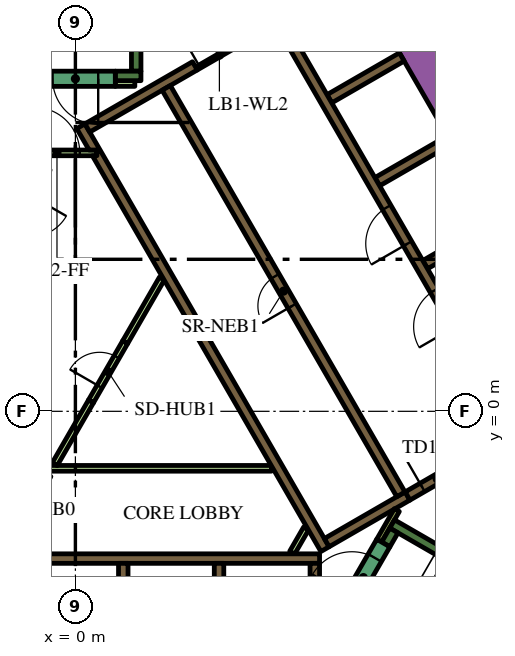
"""IFC4 building model, lengths in metres.
Left out: names, types, materials, properties, quantities, classifications, styles, units other than length and angle.
Written with IfcOpenShell. Run it as: python <this file> out.ifc"""

import sys

from ifc_helpers import new_model, si_unit, direction, frame, frame_2d, origin, place, context, subcontext, project, spatial, polyline, rectangle, outline, extrude, element, fill, save


model = new_model("IFC4")
c1 = context("Model", 3, precision=1e-05, world=origin(), true_north=direction((0.0, 1.0)))
c2 = subcontext(c1, "Body", "Model", "MODEL_VIEW")
j1 = project(units=[si_unit("LENGTHUNIT", "METRE"), si_unit("PLANEANGLEUNIT", "RADIAN")], contexts=[c1])
p1 = place(None, origin())
s1 = spatial("IfcSite", under=j1, at=p1, CompositionType="ELEMENT")
p2 = place(p1, origin())
s2 = spatial("IfcBuilding", under=s1, at=p2, CompositionType="ELEMENT")
p3 = place(p2, frame((0.0, 0.0, 27.6)))
s3 = spatial("IfcBuildingStorey", under=s2, at=p3, CompositionType="ELEMENT", Elevation=27.6)
p4 = place(p3, frame((6.776, 13.364, 0.0), z_axis=(0.0, 0.0, 1.0), x_axis=(0.500004177138, -0.8660229921, 0.0)))
e1 = element("IfcWall", 1, at=p4, inside=s3, PredefinedType="SOLIDWALL", context=c2, shape_type="SweptSolid", body=[
    extrude(rectangle(XDim=20.204, YDim=0.9, at=frame_2d((10.102, 0.0))), origin(), (0.0, 0.0, 1.0), 3.9),
])
p5 = place(p3, frame((8.334, -2.964, 0.0), z_axis=(0.0, 0.0, 1.0), x_axis=(0.866016039709, -0.500016218704, 0.0)))
e2 = element("IfcWall", 2, at=p5, inside=s3, PredefinedType="SOLIDWALL", context=c2, shape_type="SweptSolid", body=[
    extrude(rectangle(XDim=7.05, YDim=0.25, at=frame_2d((3.525, 0.0))), origin(), (0.0, 0.0, 1.0), 3.9),
])
p6 = place(p3, frame((8.168, -3.503, 0.0), z_axis=(0.0, 0.0, 1.0), x_axis=(0.49972245349, 0.866185586049, 0.0)))
e3 = element("IfcWall", 3, at=p6, inside=s3, PredefinedType="SOLIDWALL", context=c2, shape_type="SweptSolid", body=[
    extrude(rectangle(XDim=0.425, YDim=0.25, at=frame_2d((0.212, 0.0))), origin(), (0.0, 0.0, 1.0), 3.9),
])
p7 = place(p3, frame((1.6, 8.95, 0.0), z_axis=(0.0, 0.0, 1.0), x_axis=(0.0, 1.0, 0.0)))
e4 = element("IfcWall", 4, at=p7, inside=s3, PredefinedType="SOLIDWALL", context=c2, shape_type="SweptSolid", body=[
    extrude(rectangle(XDim=6.8, YDim=0.25, at=frame_2d((3.4, 0.0))), origin(), (0.0, 0.0, 1.0), 3.9),
])
p8 = place(p3, frame((1.05, 8.825, 0.0), z_axis=(0.0, 0.0, 1.0), x_axis=(1.0, 0.0, 0.0)))
e5 = element("IfcWall", 5, at=p8, inside=s3, PredefinedType="SOLIDWALL", context=c2, shape_type="SweptSolid", body=[
    extrude(rectangle(XDim=0.675, YDim=0.25, at=frame_2d((0.337, 0.0))), origin(), (0.0, 0.0, 1.0), 3.9),
])
p9 = place(p3, frame((-5.545, -3.875, 0.0), z_axis=(0.0, 0.0, 1.0), x_axis=(1.0, 0.0, 0.0)))
e6 = element("IfcWall", 6, at=p9, inside=s3, PredefinedType="SOLIDWALL", context=c2, shape_type="SweptSolid", body=[
    extrude(rectangle(XDim=11.97, YDim=0.25, at=frame_2d((5.985, 0.0))), origin(), (0.0, 0.0, 1.0), 3.9),
])
p10 = place(p3, frame((6.3, -7.268, 0.0), z_axis=(0.0, 0.0, 1.0), x_axis=(0.0, 1.0, 0.0)))
e7 = element("IfcWall", 7, at=p10, inside=s3, PredefinedType="SOLIDWALL", context=c2, shape_type="SweptSolid", body=[
    extrude(rectangle(XDim=3.268, YDim=0.25, at=frame_2d((1.634, 0.0))), origin(), (0.0, 0.0, 1.0), 3.9),
])
for number, where, z_axis, x_axis in (
    (8, (3.78, -4.0, 0.0), (0.0, 0.0, 1.0), (0.0, -1.0, 0.0)),
    (9, (1.26, -4.0, 0.0), (0.0, 0.0, 1.0), (0.0, -1.0, 0.0)),
):
    element("IfcWall", number, at=place(p3, frame(where, z_axis=z_axis, x_axis=x_axis)), inside=s3, PredefinedType="SOLIDWALL", context=c2, shape_type="SweptSolid", body=[
        extrude(rectangle(XDim=2.2, YDim=0.25, at=frame_2d((1.1, 0.0))), origin(), (0.0, 0.0, 1.0), 3.9),
    ])
p11 = place(p3, origin())
e10 = element("IfcWall", 10, at=p11, inside=s3, PredefinedType="SOLIDWALL", context=c2, shape_type="SweptSolid", body=[
    extrude(outline(polyline([(0.566, 6.725), (0.566, 6.875), (0.566, 6.875), (0.565, 6.875), (0.361, 6.875), (0.035, 7.439), (0.252, 7.564), (0.377, 7.348), (6.552, -3.348), (6.677, -3.564), (6.46, -3.689), (0.448, 6.725), (0.565, 6.725), (0.566, 6.725), (0.566, 6.725)])), origin(), (0.0, 0.0, 1.0), 3.9),
])
p12 = place(p3, frame((0.314, 7.456, 0.0), z_axis=(0.0, 0.0, 1.0), x_axis=(0.866013897511, 0.50001992892, 0.0)))
e11 = element("IfcWall", 11, at=p12, inside=s3, PredefinedType="SOLIDWALL", context=c2, shape_type="SweptSolid", body=[
    extrude(rectangle(XDim=3.268, YDim=0.25, at=frame_2d((1.634, 0.0))), origin(), (0.0, 0.0, 1.0), 3.9),
])
p13 = place(p3, frame((6.614, -3.456, 0.0), z_axis=(0.0, 0.0, 1.0), x_axis=(0.866031582473, 0.499989298045, 0.0)))
e12 = element("IfcWall", 12, at=p13, inside=s3, PredefinedType="SOLIDWALL", context=c2, shape_type="SweptSolid", body=[
    extrude(rectangle(XDim=2.455, YDim=0.25, at=frame_2d((1.228, 0.0))), origin(), (0.0, 0.0, 1.0), 3.9),
])
for number, where, z_axis, x_axis in (
    (13, (6.684, 8.224, 0.0), (0.0, 0.0, 1.0), (0.866, 0.5, 0.0)),
    (14, (7.944, 6.041, 0.0), (0.0, 0.0, 1.0), (0.866, 0.5, 0.0)),
    (15, (9.204, 3.859, 0.0), (0.0, 0.0, 1.0), (0.866, 0.5, 0.0)),
):
    element("IfcWall", number, at=place(p3, frame(where, z_axis=z_axis, x_axis=x_axis)), inside=s3, PredefinedType="SOLIDWALL", context=c2, shape_type="SweptSolid", body=[
        extrude(rectangle(XDim=2.2, YDim=0.25, at=frame_2d((1.1, 0.0))), origin(), (0.0, 0.0, 1.0), 3.9),
    ])
p14 = place(p3, frame((5.705, -3.718, 0.0), z_axis=(0.0, 0.0, 1.0), x_axis=(0.499962090823, 0.866047289552, 0.0)))
e16 = element("IfcWall", 16, at=p14, inside=s3, PredefinedType="PARTITIONING", context=c2, shape_type="SweptSolid", body=[
    extrude(rectangle(XDim=0.735, YDim=0.15, at=frame_2d((0.367, 0.0))), origin(), (0.0, 0.0, 1.0), 2.75),
])
p15 = place(p3, frame((8.459, -2.599, 0.0), z_axis=(0.0, 0.0, 1.0), x_axis=(-0.500041054325, -0.866001699761, 0.0)))
e17 = element("IfcWall", 17, at=p15, inside=s3, PredefinedType="PARTITIONING", context=c2, shape_type="SweptSolid", body=[
    extrude(rectangle(XDim=0.929, YDim=0.15, at=frame_2d((0.464, 0.0))), origin(), (0.0, 0.0, 1.0), 3.9),
])
p16 = place(p3, frame((-4.2, -1.5, 0.0), z_axis=(0.0, 0.0, 1.0), x_axis=(1.0, 0.0, 0.0)))
e18 = element("IfcWall", 18, at=p16, inside=s3, PredefinedType="PARTITIONING", context=c2, shape_type="SweptSolid", body=[
    extrude(rectangle(XDim=9.359, YDim=0.15, at=frame_2d((4.68, 0.0))), origin(), (0.0, 0.0, 1.0), 2.75),
])
p17 = place(p3, frame((-0.544, -1.393, 0.0), z_axis=(0.0, 0.0, 1.0), x_axis=(0.499928740635, 0.866066541489, 0.0)))
e19 = element("IfcWall", 19, at=p17, inside=s3, PredefinedType="PARTITIONING", context=c2, shape_type="SweptSolid", body=[
    extrude(rectangle(XDim=1.912, YDim=0.15, at=frame_2d((0.956, 0.0))), origin(), (0.0, 0.0, 1.0), 2.75),
])
p18 = place(p3, frame((1.312, 1.822, 0.0), z_axis=(0.0, 0.0, 1.0), x_axis=(0.500003549559, 0.866023354436, 0.0)))
e20 = element("IfcWall", 20, at=p18, inside=s3, PredefinedType="PARTITIONING", context=c2, shape_type="SweptSolid", body=[
    extrude(rectangle(XDim=1.93, YDim=0.15, at=frame_2d((0.965, 0.0))), origin(), (0.0, 0.0, 1.0), 2.75),
])
p19 = place(p3, frame((1.05, 8.625, 0.0), z_axis=(0.0, 0.0, 1.0), x_axis=(1.0, 0.0, 0.0)))
e21 = element("IfcWall", 21, at=p19, inside=s3, PredefinedType="PARTITIONING", context=c2, shape_type="SweptSolid", body=[
    extrude(rectangle(XDim=0.514, YDim=0.15, at=frame_2d((0.257, 0.0))), origin(), (0.0, 0.0, 1.0), 2.75),
])
p20 = place(p3, frame((11.553, -0.46, 0.0), z_axis=(0.0, 0.0, 1.0), x_axis=(-0.500006514828, 0.866021642414, 0.0)))
e22 = element("IfcWall", 22, at=p20, inside=s3, PredefinedType="SOLIDWALL", context=c2, shape_type="SweptSolid", body=[
    extrude(rectangle(XDim=12.35, YDim=0.25, at=frame_2d((6.175, 0.0))), origin(), (0.0, 0.0, 1.0), 3.9),
])
p21 = place(p20, frame((0.585, 0.0, 0.0)))
e23 = element("IfcOpeningElement", 23, at=p21, cuts=e22, PredefinedType="OPENING", context=c2, shape_type="SweptSolid", body=[
    extrude(rectangle(XDim=1.1, YDim=2.1, at=frame_2d((0.55, 1.05))), frame((0.0, 0.135, 0.0), z_axis=(0.0, -1.0, 0.0), x_axis=(1.0, 0.0, 0.0)), (0.0, 0.0, 1.0), 0.27),
])
p22 = place(p20, frame((3.105, 0.0, 0.0)))
e24 = element("IfcOpeningElement", 24, at=p22, cuts=e22, PredefinedType="OPENING", context=c2, shape_type="SweptSolid", body=[
    extrude(rectangle(XDim=1.1, YDim=2.1, at=frame_2d((0.55, 1.05))), frame((0.0, 0.135, 0.0), z_axis=(0.0, -1.0, 0.0), x_axis=(1.0, 0.0, 0.0)), (0.0, 0.0, 1.0), 0.27),
])
p23 = place(p20, frame((5.625, 0.0, 0.0)))
e25 = element("IfcOpeningElement", 25, at=p23, cuts=e22, PredefinedType="OPENING", context=c2, shape_type="SweptSolid", body=[
    extrude(rectangle(XDim=1.1, YDim=2.1, at=frame_2d((0.55, 1.05))), frame((0.0, 0.135, 0.0), z_axis=(0.0, -1.0, 0.0), x_axis=(1.0, 0.0, 0.0)), (0.0, 0.0, 1.0), 0.27),
])
p24 = place(p3, frame((8.565, -2.185, 0.0), z_axis=(0.0, 0.0, 1.0), x_axis=(-0.499997954832, 0.866026584559, 0.0)))
e26 = element("IfcWall", 26, at=p24, inside=s3, PredefinedType="SOLIDWALL", context=c2, shape_type="SweptSolid", body=[
    extrude(rectangle(XDim=12.35, YDim=0.25, at=frame_2d((6.175, 0.0))), origin(), (0.0, 0.0, 1.0), 3.9),
])
p25 = place(p24, frame((5.725, 0.0, 0.0)))
e27 = element("IfcOpeningElement", 27, at=p25, cuts=e26, PredefinedType="OPENING", context=c2, shape_type="SweptSolid", body=[
    extrude(rectangle(XDim=0.9, YDim=2.1, at=frame_2d((0.45, 1.05))), frame((0.0, 0.135, 0.0), z_axis=(0.0, -1.0, 0.0), x_axis=(1.0, 0.0, 0.0)), (0.0, 0.0, 1.0), 0.27),
])
p26 = place(p3, frame((7.053, -5.284, 0.0), z_axis=(0.0, 0.0, 1.0), x_axis=(0.500078061341, 0.865980330357, 0.0)))
e28 = element("IfcWall", 28, at=p26, inside=s3, PredefinedType="SOLIDWALL", context=c2, shape_type="SweptSolid", body=[
    extrude(rectangle(XDim=2.1, YDim=0.4, at=frame_2d((1.05, 0.0))), origin(), (0.0, 0.0, 1.0), 3.9),
])
p27 = place(p26, frame((0.45, 0.0, 0.0)))
e29 = element("IfcOpeningElement", 29, at=p27, cuts=e28, PredefinedType="OPENING", context=c2, shape_type="SweptSolid", body=[
    extrude(rectangle(XDim=1.2, YDim=2.1, at=frame_2d((0.6, 1.05))), frame((0.0, 0.21, 0.0), z_axis=(0.0, -1.0, 0.0), x_axis=(1.0, 0.0, 0.0)), (0.0, 0.0, 1.0), 0.42),
])
p28 = place(p3, frame((8.74, -2.229, 0.0), z_axis=(0.0, 0.0, 1.0), x_axis=(0.865989075817, 0.500062916607, 0.0)))
e30 = element("IfcWall", 30, at=p28, inside=s3, PredefinedType="SOLIDWALL", context=c2, shape_type="SweptSolid", body=[
    extrude(rectangle(XDim=1.8, YDim=0.25, at=frame_2d((0.9, 0.0))), origin(), (0.0, 0.0, 1.0), 3.9),
])
p29 = place(p28, frame((0.45, 0.0, 0.0)))
e31 = element("IfcOpeningElement", 31, at=p29, cuts=e30, PredefinedType="OPENING", context=c2, shape_type="SweptSolid", body=[
    extrude(rectangle(XDim=0.9, YDim=2.1, at=frame_2d((0.45, 1.05))), frame((0.0, 0.135, 0.0), z_axis=(0.0, -1.0, 0.0), x_axis=(1.0, 0.0, 0.0)), (0.0, 0.0, 1.0), 0.27),
])
p30 = place(p3, frame((1.05, 8.75, 0.0), z_axis=(0.0, 0.0, 1.0), x_axis=(-1.0, 0.0, 0.0)))
e32 = element("IfcWall", 32, at=p30, inside=s3, PredefinedType="SOLIDWALL", context=c2, shape_type="SweptSolid", body=[
    extrude(rectangle(XDim=2.1, YDim=0.4, at=frame_2d((1.05, 0.0))), origin(), (0.0, 0.0, 1.0), 3.9),
])
p31 = place(p30, frame((0.45, 0.0, 0.0)))
e33 = element("IfcOpeningElement", 33, at=p31, cuts=e32, PredefinedType="OPENING", context=c2, shape_type="SweptSolid", body=[
    extrude(rectangle(XDim=1.2, YDim=2.1, at=frame_2d((0.6, 1.05))), frame((0.0, 0.21, 0.0), z_axis=(0.0, -1.0, 0.0), x_axis=(1.0, 0.0, 0.0)), (0.0, 0.0, 1.0), 0.42),
])
p32 = place(p3, frame((-1.534, 6.8, 0.0), z_axis=(0.0, 0.0, 1.0), x_axis=(1.0, 0.0, 0.0)))
e34 = element("IfcWall", 34, at=p32, inside=s3, PredefinedType="PARTITIONING", context=c2, shape_type="SweptSolid", body=[
    extrude(rectangle(XDim=2.1, YDim=0.15, at=frame_2d((1.05, 0.0))), origin(), (0.0, 0.0, 1.0), 2.75),
])
p33 = place(p32, frame((0.45, 0.0, 0.0)))
e35 = element("IfcOpeningElement", 35, at=p33, cuts=e34, PredefinedType="OPENING", context=c2, shape_type="SweptSolid", body=[
    extrude(rectangle(XDim=1.2, YDim=2.1, at=frame_2d((0.6, 1.05))), frame((0.0, 0.085, 0.0), z_axis=(0.0, -1.0, 0.0), x_axis=(1.0, 0.0, 0.0)), (0.0, 0.0, 1.0), 0.17),
])
p34 = place(p3, frame((3.183, 9.02, 0.0), z_axis=(0.0, 0.0, 1.0), x_axis=(0.866034573852, 0.49998411664, 0.0)))
e36 = element("IfcWall", 36, at=p34, inside=s3, PredefinedType="PARTITIONING", context=c2, shape_type="SweptSolid", body=[
    extrude(rectangle(XDim=1.4, YDim=0.09, at=frame_2d((0.7, 0.0))), origin(), (0.0, 0.0, 1.0), 2.75),
])
p35 = place(p34, frame((0.1, 0.0, 0.0)))
e37 = element("IfcOpeningElement", 37, at=p35, cuts=e36, PredefinedType="OPENING", context=c2, shape_type="SweptSolid", body=[
    extrude(rectangle(XDim=1.2, YDim=2.1, at=frame_2d((0.6, 1.05))), frame((0.0, 0.055, 0.0), z_axis=(0.0, -1.0, 0.0), x_axis=(1.0, 0.0, 0.0)), (0.0, 0.0, 1.0), 0.11),
])
p36 = place(p3, frame((0.412, 0.263, 0.0), z_axis=(0.0, 0.0, 1.0), x_axis=(0.500062916607, 0.865989075817, 0.0)))
e38 = element("IfcWall", 38, at=p36, inside=s3, PredefinedType="PARTITIONING", context=c2, shape_type="SweptSolid", body=[
    extrude(rectangle(XDim=1.8, YDim=0.15, at=frame_2d((0.9, 0.0))), origin(), (0.0, 0.0, 1.0), 2.75),
])
p37 = place(p36, frame((0.45, 0.0, 0.0)))
e39 = element("IfcOpeningElement", 39, at=p37, cuts=e38, PredefinedType="OPENING", context=c2, shape_type="SweptSolid", body=[
    extrude(rectangle(XDim=0.9, YDim=2.1, at=frame_2d((0.45, 1.05))), frame((0.0, 0.085, 0.0), z_axis=(0.0, -1.0, 0.0), x_axis=(1.0, 0.0, 0.0)), (0.0, 0.0, 1.0), 0.17),
])
p38 = place(p3, frame((6.163, 18.475, 0.0), z_axis=(0.0, 0.0, 1.0), x_axis=(0.500001317485, -0.866024643133, 0.0)))
e40 = element("IfcWall", 40, at=p38, inside=s3, PredefinedType="PARTITIONING", context=c2, shape_type="SweptSolid", body=[
    extrude(rectangle(XDim=25.767, YDim=0.15, at=frame_2d((12.883, 0.0))), origin(), (0.0, 0.0, 1.0), 2.75),
])
p39 = place(p38, frame((24.586, 0.0, 0.0)))
e41 = element("IfcOpeningElement", 41, at=p39, cuts=e40, PredefinedType="OPENING", context=c2, shape_type="SweptSolid", body=[
    extrude(rectangle(XDim=1.0, YDim=2.1, at=frame_2d((0.5, 1.05))), frame((0.0, 0.085, 0.0), z_axis=(0.0, -1.0, 0.0), x_axis=(1.0, 0.0, 0.0)), (0.0, 0.0, 1.0), 0.17),
])
p40 = place(p38, frame((19.319, 0.0, 0.0)))
e42 = element("IfcOpeningElement", 42, at=p40, cuts=e40, PredefinedType="OPENING", context=c2, shape_type="SweptSolid", body=[
    extrude(rectangle(XDim=1.0, YDim=2.1, at=frame_2d((0.5, 1.05))), frame((0.0, 0.085, 0.0), z_axis=(0.0, -1.0, 0.0), x_axis=(1.0, 0.0, 0.0)), (0.0, 0.0, 1.0), 0.17),
])
p41 = place(p38, frame((18.012, 0.0, 0.0)))
e43 = element("IfcOpeningElement", 43, at=p41, cuts=e40, PredefinedType="OPENING", context=c2, shape_type="SweptSolid", body=[
    extrude(rectangle(XDim=1.0, YDim=2.1, at=frame_2d((0.5, 1.05))), frame((0.0, 0.085, 0.0), z_axis=(0.0, -1.0, 0.0), x_axis=(1.0, 0.0, 0.0)), (0.0, 0.0, 1.0), 0.17),
])
p42 = place(p38, frame((6.824, 0.0, 0.0)))
e44 = element("IfcOpeningElement", 44, at=p42, cuts=e40, PredefinedType="OPENING", context=c2, shape_type="SweptSolid", body=[
    extrude(rectangle(XDim=1.1, YDim=2.1, at=frame_2d((0.55, 1.05))), frame((0.0, 0.085, 0.0), z_axis=(0.0, -1.0, 0.0), x_axis=(1.0, 0.0, 0.0)), (0.0, 0.0, 1.0), 0.17),
])
p43 = place(p38, frame((4.658, 0.0, 0.0)))
e45 = element("IfcOpeningElement", 45, at=p43, cuts=e40, PredefinedType="OPENING", context=c2, shape_type="SweptSolid", body=[
    extrude(rectangle(XDim=0.9, YDim=2.1, at=frame_2d((0.45, 1.05))), frame((0.0, 0.085, 0.0), z_axis=(0.0, -1.0, 0.0), x_axis=(1.0, 0.0, 0.0)), (0.0, 0.0, 1.0), 0.17),
])
p44 = place(p38, frame((0.18, 0.0, 0.0)))
e46 = element("IfcOpeningElement", 46, at=p44, cuts=e40, PredefinedType="OPENING", context=c2, shape_type="SweptSolid", body=[
    extrude(rectangle(XDim=1.0, YDim=2.1, at=frame_2d((0.5, 1.05))), frame((0.0, 0.085, 0.0), z_axis=(0.0, -1.0, 0.0), x_axis=(1.0, 0.0, 0.0)), (0.0, 0.0, 1.0), 0.17),
])
p45 = place(p22, origin())
e47 = element("IfcDoor", 47, at=p45, inside=s3, OperationType="DOUBLE_DOOR_SLIDING", PredefinedType="DOOR", context=c2, shape_type="SweptSolid", body=[
    extrude(rectangle(XDim=1.1, YDim=2.1, at=frame_2d((0.55, 1.05))), frame((0.0, 0.025, 0.0), z_axis=(0.0, -1.0, 0.0), x_axis=(1.0, 0.0, 0.0)), (0.0, 0.0, 1.0), 0.05),
])
fill(e24, e47)
p46 = place(p23, origin())
e48 = element("IfcDoor", 48, at=p46, inside=s3, OperationType="DOUBLE_DOOR_SLIDING", PredefinedType="DOOR", context=c2, shape_type="SweptSolid", body=[
    extrude(rectangle(XDim=1.1, YDim=2.1, at=frame_2d((0.55, 1.05))), frame((0.0, 0.025, 0.0), z_axis=(0.0, -1.0, 0.0), x_axis=(1.0, 0.0, 0.0)), (0.0, 0.0, 1.0), 0.05),
])
fill(e25, e48)
p47 = place(p25, origin())
e49 = element("IfcDoor", 49, at=p47, inside=s3, OperationType="SINGLE_SWING_LEFT", PredefinedType="DOOR", context=c2, shape_type="SweptSolid", body=[
    extrude(rectangle(XDim=0.9, YDim=2.1, at=frame_2d((0.45, 1.05))), frame((0.0, 0.025, 0.0), z_axis=(0.0, -1.0, 0.0), x_axis=(1.0, 0.0, 0.0)), (0.0, 0.0, 1.0), 0.05),
])
fill(e27, e49)
p48 = place(p27, origin())
e50 = element("IfcDoor", 50, at=p48, inside=s3, OperationType="SINGLE_SWING_LEFT", PredefinedType="DOOR", context=c2, shape_type="SweptSolid", body=[
    extrude(rectangle(XDim=1.2, YDim=2.1, at=frame_2d((0.6, 1.05))), frame((0.0, 0.025, 0.0), z_axis=(0.0, -1.0, 0.0), x_axis=(1.0, 0.0, 0.0)), (0.0, 0.0, 1.0), 0.05),
])
fill(e29, e50)
p49 = place(p29, origin())
e51 = element("IfcDoor", 51, at=p49, inside=s3, OperationType="SINGLE_SWING_LEFT", PredefinedType="DOOR", context=c2, shape_type="SweptSolid", body=[
    extrude(rectangle(XDim=0.9, YDim=2.1, at=frame_2d((0.45, 1.05))), frame((0.0, 0.025, 0.0), z_axis=(0.0, -1.0, 0.0), x_axis=(1.0, 0.0, 0.0)), (0.0, 0.0, 1.0), 0.05),
])
fill(e31, e51)
p50 = place(p31, origin())
e52 = element("IfcDoor", 52, at=p50, inside=s3, OperationType="SINGLE_SWING_LEFT", PredefinedType="DOOR", context=c2, shape_type="SweptSolid", body=[
    extrude(rectangle(XDim=1.2, YDim=2.1, at=frame_2d((0.6, 1.05))), frame((0.0, 0.025, 0.0), z_axis=(0.0, -1.0, 0.0), x_axis=(1.0, 0.0, 0.0)), (0.0, 0.0, 1.0), 0.05),
])
fill(e33, e52)
p51 = place(p33, origin())
e53 = element("IfcDoor", 53, at=p51, inside=s3, OperationType="SINGLE_SWING_LEFT", PredefinedType="DOOR", context=c2, shape_type="SweptSolid", body=[
    extrude(rectangle(XDim=1.2, YDim=2.1, at=frame_2d((0.6, 1.05))), frame((0.0, 0.025, 0.0), z_axis=(0.0, -1.0, 0.0), x_axis=(1.0, 0.0, 0.0)), (0.0, 0.0, 1.0), 0.05),
])
fill(e35, e53)
p52 = place(p35, origin())
e54 = element("IfcDoor", 54, at=p52, inside=s3, OperationType="SINGLE_SWING_LEFT", PredefinedType="DOOR", context=c2, shape_type="SweptSolid", body=[
    extrude(rectangle(XDim=1.2, YDim=2.1, at=frame_2d((0.6, 1.05))), frame((0.0, 0.025, 0.0), z_axis=(0.0, -1.0, 0.0), x_axis=(1.0, 0.0, 0.0)), (0.0, 0.0, 1.0), 0.05),
])
fill(e37, e54)
p53 = place(p37, origin())
e55 = element("IfcDoor", 55, at=p53, inside=s3, OperationType="SINGLE_SWING_LEFT", PredefinedType="DOOR", context=c2, shape_type="SweptSolid", body=[
    extrude(rectangle(XDim=0.9, YDim=2.1, at=frame_2d((0.45, 1.05))), frame((0.0, 0.025, 0.0), z_axis=(0.0, -1.0, 0.0), x_axis=(1.0, 0.0, 0.0)), (0.0, 0.0, 1.0), 0.05),
])
fill(e39, e55)
save(model, sys.argv[1])
